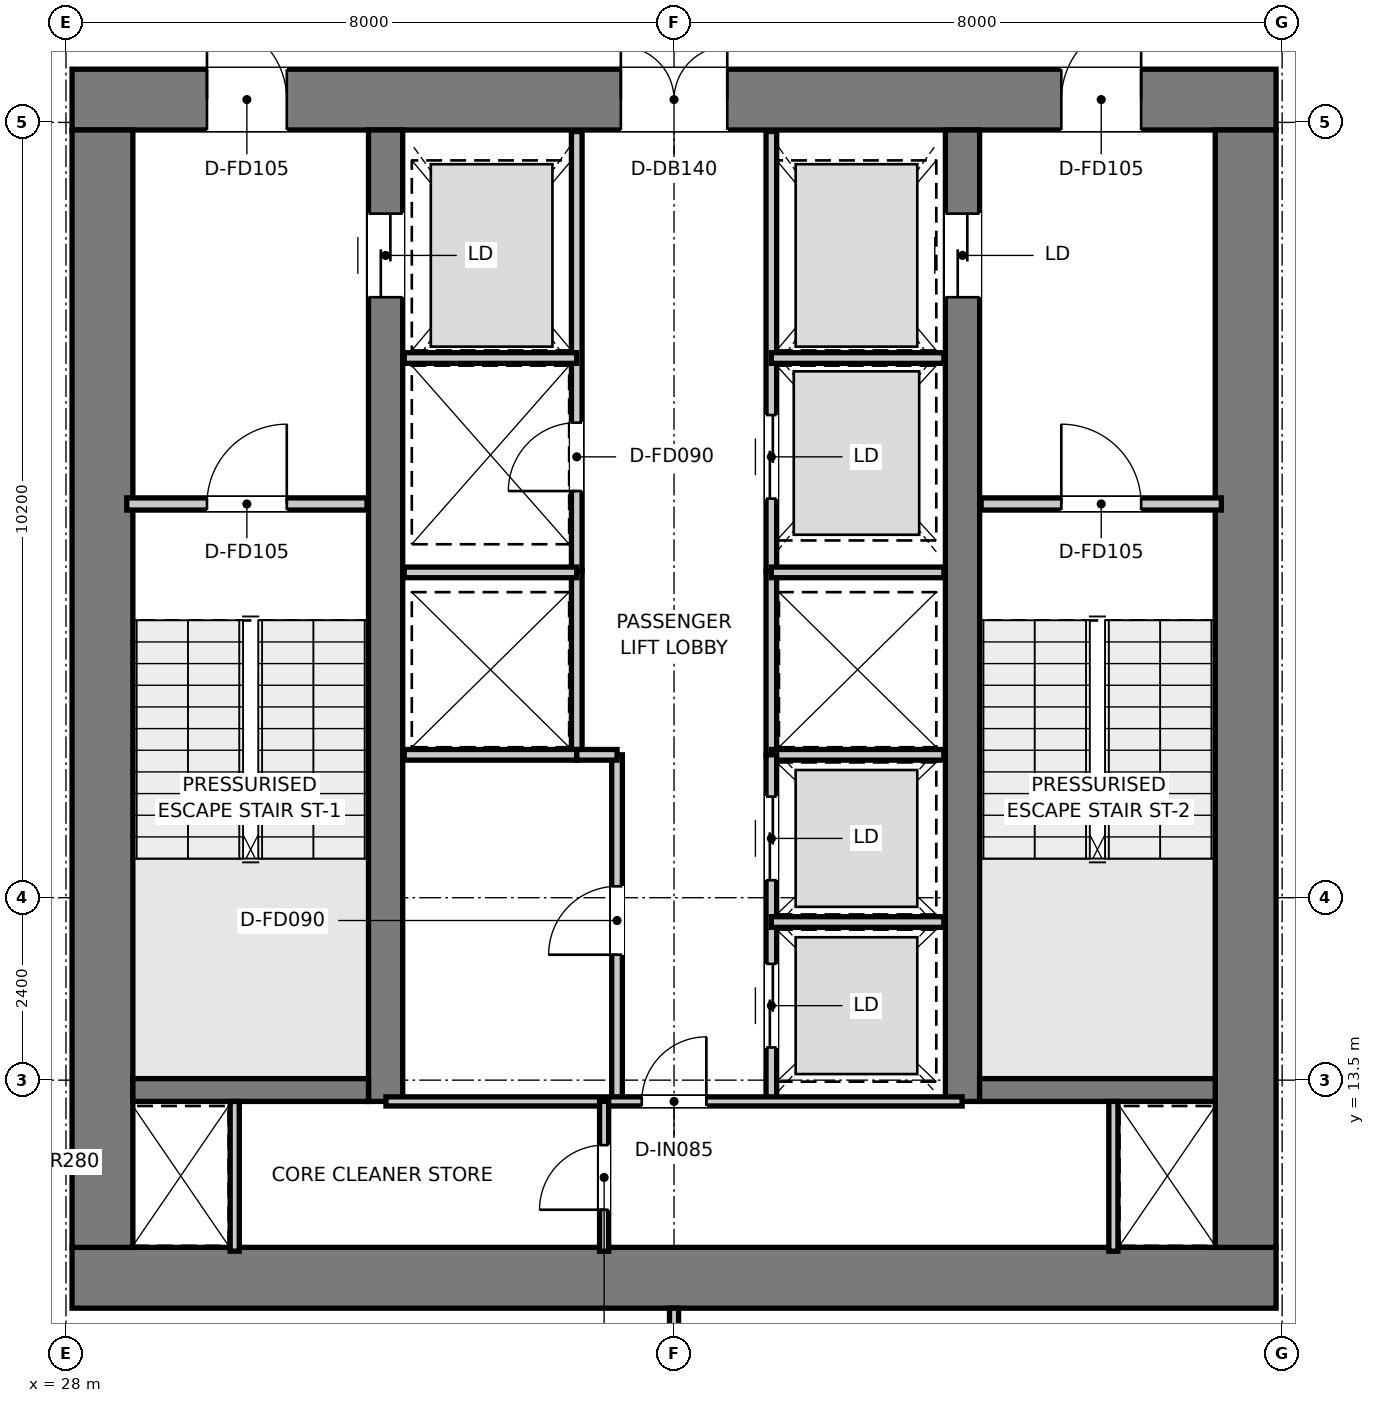
"""IFC4 building model, lengths in metres.
Left out: names, types, materials, properties, quantities, classifications, styles, units other than length and angle.
Written with IfcOpenShell. Run it as: python <this file> out.ifc"""

import sys

from ifc_helpers import new_model, si_unit, direction, frame, frame_2d, origin, place, context, subcontext, project, spatial, rectangle, extrude, element, fill, save


model = new_model("IFC4")
c1 = context("Model", 3, precision=1e-05, world=origin(), true_north=direction((0.0, 1.0)))
c2 = subcontext(c1, "Body", "Model", "MODEL_VIEW")
j1 = project(units=[si_unit("LENGTHUNIT", "METRE"), si_unit("PLANEANGLEUNIT", "RADIAN")], contexts=[c1])
p1 = place(None, origin())
s1 = spatial("IfcSite", under=j1, at=p1, CompositionType="ELEMENT")
p2 = place(p1, origin())
s2 = spatial("IfcBuilding", under=s1, at=p2, CompositionType="ELEMENT")
p3 = place(p2, frame((0.0, 0.0, 258.65)))
s3 = spatial("IfcBuildingStorey", under=s2, at=p3, CompositionType="ELEMENT", Elevation=258.65)
p4 = place(p3, frame((28.08, 10.9, 0.0), z_axis=(0.0, 0.0, 1.0), x_axis=(1.0, 0.0, 0.0)))
e1 = element("IfcWall", 1, at=p4, inside=s3, PredefinedType="SHEAR", context=c2, shape_type="SweptSolid", body=[
    extrude(rectangle(XDim=15.84, YDim=0.8, at=frame_2d((7.92, 0.0))), origin(), (0.0, 0.0, 1.0), 3.95),
])
p5 = place(p3, frame((28.08, 26.4, 0.0), z_axis=(0.0, 0.0, 1.0), x_axis=(1.0, 0.0, 0.0)))
e2 = element("IfcWall", 2, at=p5, inside=s3, PredefinedType="SHEAR", context=c2, shape_type="SweptSolid", body=[
    extrude(rectangle(XDim=15.84, YDim=0.8, at=frame_2d((7.92, 0.0))), origin(), (0.0, 0.0, 1.0), 3.95),
])
p6 = place(p5, frame((7.22, 0.0, 0.0)))
e3 = element("IfcOpeningElement", 3, at=p6, cuts=e2, PredefinedType="OPENING", context=c2, shape_type="SweptSolid", body=[
    extrude(rectangle(XDim=1.4, YDim=2.2, at=frame_2d((0.7, 1.1))), frame((0.0, 0.41, 0.0), z_axis=(0.0, -1.0, 0.0), x_axis=(1.0, 0.0, 0.0)), (0.0, 0.0, 1.0), 0.82),
])
p7 = place(p5, frame((1.775, 0.0, 0.0)))
e4 = element("IfcOpeningElement", 4, at=p7, cuts=e2, PredefinedType="OPENING", context=c2, shape_type="SweptSolid", body=[
    extrude(rectangle(XDim=1.05, YDim=2.1, at=frame_2d((0.525, 1.05))), frame((0.0, 0.41, 0.0), z_axis=(0.0, -1.0, 0.0), x_axis=(1.0, 0.0, 0.0)), (0.0, 0.0, 1.0), 0.82),
])
p8 = place(p5, frame((13.015, 0.0, 0.0)))
e5 = element("IfcOpeningElement", 5, at=p8, cuts=e2, PredefinedType="OPENING", context=c2, shape_type="SweptSolid", body=[
    extrude(rectangle(XDim=1.05, YDim=2.1, at=frame_2d((0.525, 1.05))), frame((0.0, 0.41, 0.0), z_axis=(0.0, -1.0, 0.0), x_axis=(1.0, 0.0, 0.0)), (0.0, 0.0, 1.0), 0.82),
])
for number, where, z_axis, x_axis in (
    (6, (28.48, 11.3, 0.0), (0.0, 0.0, 1.0), (0.0, 1.0, 0.0)),
    (7, (43.52, 11.3, 0.0), (0.0, 0.0, 1.0), (0.0, 1.0, 0.0)),
):
    element("IfcWall", number, at=place(p3, frame(where, z_axis=z_axis, x_axis=x_axis)), inside=s3, PredefinedType="SHEAR", context=c2, shape_type="SweptSolid", body=[
        extrude(rectangle(XDim=14.7, YDim=0.8, at=frame_2d((7.35, 0.0))), origin(), (0.0, 0.0, 1.0), 3.95),
    ])
p9 = place(p3, frame((32.205, 13.22, 0.0), z_axis=(0.0, 0.0, 1.0), x_axis=(0.0, 1.0, 0.0)))
e8 = element("IfcWall", 8, at=p9, inside=s3, PredefinedType="SHEAR", context=c2, shape_type="SweptSolid", body=[
    extrude(rectangle(XDim=12.78, YDim=0.45, at=frame_2d((6.39, 0.0))), origin(), (0.0, 0.0, 1.0), 3.95),
])
p10 = place(p9, frame((10.58, 0.0, 0.0)))
e9 = element("IfcOpeningElement", 9, at=p10, cuts=e8, PredefinedType="OPENING", context=c2, shape_type="SweptSolid", body=[
    extrude(rectangle(XDim=1.1, YDim=2.15, at=frame_2d((0.55, 1.075))), frame((0.0, 0.235, 0.0), z_axis=(0.0, -1.0, 0.0), x_axis=(1.0, 0.0, 0.0)), (0.0, 0.0, 1.0), 0.47),
])
p11 = place(p3, frame((39.795, 13.22, 0.0), z_axis=(0.0, 0.0, 1.0), x_axis=(0.0, 1.0, 0.0)))
e10 = element("IfcWall", 10, at=p11, inside=s3, PredefinedType="SHEAR", context=c2, shape_type="SweptSolid", body=[
    extrude(rectangle(XDim=12.78, YDim=0.45, at=frame_2d((6.39, 0.0))), origin(), (0.0, 0.0, 1.0), 3.95),
])
p12 = place(p11, frame((10.58, 0.0, 0.0)))
e11 = element("IfcOpeningElement", 11, at=p12, cuts=e10, PredefinedType="OPENING", context=c2, shape_type="SweptSolid", body=[
    extrude(rectangle(XDim=1.1, YDim=2.15, at=frame_2d((0.55, 1.075))), frame((0.0, 0.235, 0.0), z_axis=(0.0, -1.0, 0.0), x_axis=(1.0, 0.0, 0.0)), (0.0, 0.0, 1.0), 0.47),
])
for number, where, z_axis, x_axis in (
    (12, (28.88, 13.37, 0.0), (0.0, 0.0, 1.0), (1.0, 0.0, 0.0)),
    (13, (40.02, 13.37, 0.0), (0.0, 0.0, 1.0), (1.0, 0.0, 0.0)),
):
    element("IfcWall", number, at=place(p3, frame(where, z_axis=z_axis, x_axis=x_axis)), inside=s3, PredefinedType="SHEAR", context=c2, shape_type="SweptSolid", body=[
        extrude(rectangle(XDim=3.1, YDim=0.3, at=frame_2d((1.55, 0.0))), origin(), (0.0, 0.0, 1.0), 3.95),
    ])
p13 = place(p3, frame((28.8, 21.08, 0.0), z_axis=(0.0, 0.0, 1.0), x_axis=(1.0, 0.0, 0.0)))
e14 = element("IfcWall", 14, at=p13, inside=s3, PredefinedType="PARTITIONING", context=c2, shape_type="SweptSolid", body=[
    extrude(rectangle(XDim=3.16, YDim=0.16, at=frame_2d((1.58, 0.0))), origin(), (0.0, 0.0, 1.0), 3.6),
])
p14 = place(p13, frame((1.055, 0.0, 0.0)))
e15 = element("IfcOpeningElement", 15, at=p14, cuts=e14, PredefinedType="OPENING", context=c2, shape_type="SweptSolid", body=[
    extrude(rectangle(XDim=1.05, YDim=2.1, at=frame_2d((0.525, 1.05))), frame((0.0, 0.09, 0.0), z_axis=(0.0, -1.0, 0.0), x_axis=(1.0, 0.0, 0.0)), (0.0, 0.0, 1.0), 0.18),
])
p15 = place(p3, frame((40.04, 21.08, 0.0), z_axis=(0.0, 0.0, 1.0), x_axis=(1.0, 0.0, 0.0)))
e16 = element("IfcWall", 16, at=p15, inside=s3, PredefinedType="PARTITIONING", context=c2, shape_type="SweptSolid", body=[
    extrude(rectangle(XDim=3.16, YDim=0.16, at=frame_2d((1.58, 0.0))), origin(), (0.0, 0.0, 1.0), 3.6),
])
p16 = place(p15, frame((1.055, 0.0, 0.0)))
e17 = element("IfcOpeningElement", 17, at=p16, cuts=e16, PredefinedType="OPENING", context=c2, shape_type="SweptSolid", body=[
    extrude(rectangle(XDim=1.05, YDim=2.1, at=frame_2d((0.525, 1.05))), frame((0.0, 0.09, 0.0), z_axis=(0.0, -1.0, 0.0), x_axis=(1.0, 0.0, 0.0)), (0.0, 0.0, 1.0), 0.18),
])
p17 = place(p3, frame((34.72, 20.2, 0.0), z_axis=(0.0, 0.0, 1.0), x_axis=(0.0, 1.0, 0.0)))
e18 = element("IfcWall", 18, at=p17, inside=s3, PredefinedType="PARTITIONING", context=c2, shape_type="SweptSolid", body=[
    extrude(rectangle(XDim=5.78, YDim=0.14, at=frame_2d((2.89, 0.0))), origin(), (0.0, 0.0, 1.0), 2.75),
])
p18 = place(p17, frame((1.05, 0.0, 0.0)))
e19 = element("IfcOpeningElement", 19, at=p18, cuts=e18, PredefinedType="OPENING", context=c2, shape_type="SweptSolid", body=[
    extrude(rectangle(XDim=0.9, YDim=2.1, at=frame_2d((0.45, 1.05))), frame((0.0, 0.08, 0.0), z_axis=(0.0, -1.0, 0.0), x_axis=(1.0, 0.0, 0.0)), (0.0, 0.0, 1.0), 0.16),
])
p19 = place(p3, frame((37.28, 20.2, 0.0), z_axis=(0.0, 0.0, 1.0), x_axis=(0.0, 1.0, 0.0)))
e20 = element("IfcWall", 20, at=p19, inside=s3, PredefinedType="PARTITIONING", context=c2, shape_type="SweptSolid", body=[
    extrude(rectangle(XDim=5.78, YDim=0.14, at=frame_2d((2.89, 0.0))), origin(), (0.0, 0.0, 1.0), 2.75),
])
p20 = place(p19, frame((0.95, 0.0, 0.0)))
e21 = element("IfcOpeningElement", 21, at=p20, cuts=e20, PredefinedType="OPENING", context=c2, shape_type="SweptSolid", body=[
    extrude(rectangle(XDim=1.1, YDim=2.15, at=frame_2d((0.55, 1.075))), frame((0.0, 0.08, 0.0), z_axis=(0.0, -1.0, 0.0), x_axis=(1.0, 0.0, 0.0)), (0.0, 0.0, 1.0), 0.16),
])
for number, where, z_axis, x_axis in (
    (22, (32.45, 23.0, 0.0), (0.0, 0.0, 1.0), (1.0, 0.0, 0.0)),
    (23, (37.28, 23.0, 0.0), (0.0, 0.0, 1.0), (1.0, 0.0, 0.0)),
):
    element("IfcWall", number, at=place(p3, frame(where, z_axis=z_axis, x_axis=x_axis)), inside=s3, PredefinedType="PARTITIONING", context=c2, shape_type="SweptSolid", body=[
        extrude(rectangle(XDim=2.27, YDim=0.14, at=frame_2d((1.135, 0.0))), origin(), (0.0, 0.0, 1.0), 2.75),
    ])
for number, where, z_axis, x_axis in (
    (24, (34.72, 17.78, 0.0), (0.0, 0.0, 1.0), (0.0, 1.0, 0.0)),
    (25, (37.28, 17.78, 0.0), (0.0, 0.0, 1.0), (0.0, 1.0, 0.0)),
):
    element("IfcWall", number, at=place(p3, frame(where, z_axis=z_axis, x_axis=x_axis)), inside=s3, PredefinedType="PARTITIONING", context=c2, shape_type="SweptSolid", body=[
        extrude(rectangle(XDim=2.42, YDim=0.14, at=frame_2d((1.21, 0.0))), origin(), (0.0, 0.0, 1.0), 3.6),
    ])
for number, where, z_axis, x_axis in (
    (26, (32.45, 17.78, 0.0), (0.0, 0.0, 1.0), (1.0, 0.0, 0.0)),
    (27, (32.45, 20.18, 0.0), (0.0, 0.0, 1.0), (1.0, 0.0, 0.0)),
    (28, (37.28, 17.78, 0.0), (0.0, 0.0, 1.0), (1.0, 0.0, 0.0)),
    (29, (37.28, 20.18, 0.0), (0.0, 0.0, 1.0), (1.0, 0.0, 0.0)),
):
    element("IfcWall", number, at=place(p3, frame(where, z_axis=z_axis, x_axis=x_axis)), inside=s3, PredefinedType="PARTITIONING", context=c2, shape_type="SweptSolid", body=[
        extrude(rectangle(XDim=2.27, YDim=0.14, at=frame_2d((1.135, 0.0))), origin(), (0.0, 0.0, 1.0), 3.6),
    ])
p21 = place(p3, frame((35.25, 13.22, 0.0), z_axis=(0.0, 0.0, 1.0), x_axis=(0.0, 1.0, 0.0)))
e30 = element("IfcWall", 30, at=p21, inside=s3, PredefinedType="PARTITIONING", context=c2, shape_type="SweptSolid", body=[
    extrude(rectangle(XDim=4.56, YDim=0.14, at=frame_2d((2.28, 0.0))), origin(), (0.0, 0.0, 1.0), 3.6),
])
p22 = place(p21, frame((1.93, 0.0, 0.0)))
e31 = element("IfcOpeningElement", 31, at=p22, cuts=e30, PredefinedType="OPENING", context=c2, shape_type="SweptSolid", body=[
    extrude(rectangle(XDim=0.9, YDim=2.1, at=frame_2d((0.45, 1.05))), frame((0.0, 0.08, 0.0), z_axis=(0.0, -1.0, 0.0), x_axis=(1.0, 0.0, 0.0)), (0.0, 0.0, 1.0), 0.16),
])
p23 = place(p3, frame((34.72, 17.78, 0.0), z_axis=(0.0, 0.0, 1.0), x_axis=(1.0, 0.0, 0.0)))
e32 = element("IfcWall", 32, at=p23, inside=s3, PredefinedType="PARTITIONING", context=c2, shape_type="SweptSolid", body=[
    extrude(rectangle(XDim=0.53, YDim=0.14, at=frame_2d((0.265, 0.0))), origin(), (0.0, 0.0, 1.0), 3.6),
])
p24 = place(p3, frame((37.28, 13.22, 0.0), z_axis=(0.0, 0.0, 1.0), x_axis=(0.0, 1.0, 0.0)))
e33 = element("IfcWall", 33, at=p24, inside=s3, PredefinedType="PARTITIONING", context=c2, shape_type="SweptSolid", body=[
    extrude(rectangle(XDim=4.56, YDim=0.14, at=frame_2d((2.28, 0.0))), origin(), (0.0, 0.0, 1.0), 3.6),
])
p25 = place(p24, frame((0.71, 0.0, 0.0)))
e34 = element("IfcOpeningElement", 34, at=p25, cuts=e33, PredefinedType="OPENING", context=c2, shape_type="SweptSolid", body=[
    extrude(rectangle(XDim=1.1, YDim=2.15, at=frame_2d((0.55, 1.075))), frame((0.0, 0.08, 0.0), z_axis=(0.0, -1.0, 0.0), x_axis=(1.0, 0.0, 0.0)), (0.0, 0.0, 1.0), 0.16),
])
p26 = place(p24, frame((2.91, 0.0, 0.0)))
e35 = element("IfcOpeningElement", 35, at=p26, cuts=e33, PredefinedType="OPENING", context=c2, shape_type="SweptSolid", body=[
    extrude(rectangle(XDim=1.1, YDim=2.15, at=frame_2d((0.55, 1.075))), frame((0.0, 0.08, 0.0), z_axis=(0.0, -1.0, 0.0), x_axis=(1.0, 0.0, 0.0)), (0.0, 0.0, 1.0), 0.16),
])
p27 = place(p3, frame((37.28, 15.58, 0.0), z_axis=(0.0, 0.0, 1.0), x_axis=(1.0, 0.0, 0.0)))
e36 = element("IfcWall", 36, at=p27, inside=s3, PredefinedType="PARTITIONING", context=c2, shape_type="SweptSolid", body=[
    extrude(rectangle(XDim=2.27, YDim=0.14, at=frame_2d((1.135, 0.0))), origin(), (0.0, 0.0, 1.0), 3.6),
])
for number, where, z_axis, x_axis in (
    (37, (30.22, 11.25, 0.0), (0.0, 0.0, 1.0), (0.0, 1.0, 0.0)),
    (38, (41.78, 11.25, 0.0), (0.0, 0.0, 1.0), (0.0, 1.0, 0.0)),
):
    element("IfcWall", number, at=place(p3, frame(where, z_axis=z_axis, x_axis=x_axis)), inside=s3, PredefinedType="PARTITIONING", context=c2, shape_type="SweptSolid", body=[
        extrude(rectangle(XDim=1.97, YDim=0.12, at=frame_2d((0.985, 0.0))), origin(), (0.0, 0.0, 1.0), 3.6),
    ])
p28 = place(p3, frame((32.21, 13.22, 0.0), z_axis=(0.0, 0.0, 1.0), x_axis=(1.0, 0.0, 0.0)))
e39 = element("IfcWall", 39, at=p28, inside=s3, PredefinedType="PARTITIONING", context=c2, shape_type="SweptSolid", body=[
    extrude(rectangle(XDim=7.58, YDim=0.12, at=frame_2d((3.79, 0.0))), origin(), (0.0, 0.0, 1.0), 3.6),
])
p29 = place(p28, frame((3.365, 0.0, 0.0)))
e40 = element("IfcOpeningElement", 40, at=p29, cuts=e39, PredefinedType="OPENING", context=c2, shape_type="SweptSolid", body=[
    extrude(rectangle(XDim=0.85, YDim=2.1, at=frame_2d((0.425, 1.05))), frame((0.0, 0.07, 0.0), z_axis=(0.0, -1.0, 0.0), x_axis=(1.0, 0.0, 0.0)), (0.0, 0.0, 1.0), 0.14),
])
p30 = place(p3, frame((35.08, 11.25, 0.0), z_axis=(0.0, 0.0, 1.0), x_axis=(0.0, 1.0, 0.0)))
e41 = element("IfcWall", 41, at=p30, inside=s3, PredefinedType="PARTITIONING", context=c2, shape_type="SweptSolid", body=[
    extrude(rectangle(XDim=1.97, YDim=0.12, at=frame_2d((0.985, 0.0))), origin(), (0.0, 0.0, 1.0), 3.6),
])
p31 = place(p30, frame((0.545, 0.0, 0.0)))
e42 = element("IfcOpeningElement", 42, at=p31, cuts=e41, PredefinedType="OPENING", context=c2, shape_type="SweptSolid", body=[
    extrude(rectangle(XDim=0.85, YDim=2.1, at=frame_2d((0.425, 1.05))), frame((0.0, 0.07, 0.0), z_axis=(0.0, -1.0, 0.0), x_axis=(1.0, 0.0, 0.0)), (0.0, 0.0, 1.0), 0.14),
])
p32 = place(p3, frame((36.0, 3.475, 0.0), z_axis=(0.0, 0.0, 1.0), x_axis=(0.0, 1.0, 0.0)))
e43 = element("IfcWall", 43, at=p32, inside=s3, PredefinedType="PARTITIONING", context=c2, shape_type="SweptSolid", body=[
    extrude(rectangle(XDim=7.025, YDim=0.12, at=frame_2d((3.512, 0.0))), origin(), (0.0, 0.0, 1.0), 3.6),
])
p33 = place(p14, origin())
e44 = element("IfcDoor", 44, at=p33, inside=s3, OperationType="SINGLE_SWING_RIGHT", PredefinedType="DOOR", context=c2, shape_type="SweptSolid", body=[
    extrude(rectangle(XDim=1.05, YDim=2.1, at=frame_2d((0.525, 1.05))), frame((0.0, 0.025, 0.0), z_axis=(0.0, -1.0, 0.0), x_axis=(1.0, 0.0, 0.0)), (0.0, 0.0, 1.0), 0.05),
])
fill(e15, e44)
p34 = place(p16, origin())
e45 = element("IfcDoor", 45, at=p34, inside=s3, OperationType="SINGLE_SWING_LEFT", PredefinedType="DOOR", context=c2, shape_type="SweptSolid", body=[
    extrude(rectangle(XDim=1.05, YDim=2.1, at=frame_2d((0.525, 1.05))), frame((0.0, 0.025, 0.0), z_axis=(0.0, -1.0, 0.0), x_axis=(1.0, 0.0, 0.0)), (0.0, 0.0, 1.0), 0.05),
])
fill(e17, e45)
p35 = place(p6, origin())
e46 = element("IfcDoor", 46, at=p35, inside=s3, OperationType="DOUBLE_DOOR_SINGLE_SWING", PredefinedType="DOOR", context=c2, shape_type="SweptSolid", body=[
    extrude(rectangle(XDim=1.4, YDim=2.2, at=frame_2d((0.7, 1.1))), frame((0.0, 0.025, 0.0), z_axis=(0.0, -1.0, 0.0), x_axis=(1.0, 0.0, 0.0)), (0.0, 0.0, 1.0), 0.05),
])
fill(e3, e46)
p36 = place(p7, origin())
e47 = element("IfcDoor", 47, at=p36, inside=s3, OperationType="SINGLE_SWING_LEFT", PredefinedType="DOOR", context=c2, shape_type="SweptSolid", body=[
    extrude(rectangle(XDim=1.05, YDim=2.1, at=frame_2d((0.525, 1.05))), frame((0.0, 0.025, 0.0), z_axis=(0.0, -1.0, 0.0), x_axis=(1.0, 0.0, 0.0)), (0.0, 0.0, 1.0), 0.05),
])
fill(e4, e47)
p37 = place(p8, origin())
e48 = element("IfcDoor", 48, at=p37, inside=s3, OperationType="SINGLE_SWING_RIGHT", PredefinedType="DOOR", context=c2, shape_type="SweptSolid", body=[
    extrude(rectangle(XDim=1.05, YDim=2.1, at=frame_2d((0.525, 1.05))), frame((0.0, 0.025, 0.0), z_axis=(0.0, -1.0, 0.0), x_axis=(1.0, 0.0, 0.0)), (0.0, 0.0, 1.0), 0.05),
])
fill(e5, e48)
p38 = place(p10, origin())
e49 = element("IfcDoor", 49, at=p38, inside=s3, OperationType="DOUBLE_DOOR_SLIDING", PredefinedType="DOOR", context=c2, shape_type="SweptSolid", body=[
    extrude(rectangle(XDim=1.1, YDim=2.15, at=frame_2d((0.55, 1.075))), frame((0.0, 0.025, 0.0), z_axis=(0.0, -1.0, 0.0), x_axis=(1.0, 0.0, 0.0)), (0.0, 0.0, 1.0), 0.05),
])
fill(e9, e49)
p39 = place(p12, origin())
e50 = element("IfcDoor", 50, at=p39, inside=s3, OperationType="DOUBLE_DOOR_SLIDING", PredefinedType="DOOR", context=c2, shape_type="SweptSolid", body=[
    extrude(rectangle(XDim=1.1, YDim=2.15, at=frame_2d((0.55, 1.075))), frame((0.0, 0.025, 0.0), z_axis=(0.0, -1.0, 0.0), x_axis=(1.0, 0.0, 0.0)), (0.0, 0.0, 1.0), 0.05),
])
fill(e11, e50)
p40 = place(p18, origin())
e51 = element("IfcDoor", 51, at=p40, inside=s3, OperationType="SINGLE_SWING_LEFT", PredefinedType="DOOR", context=c2, shape_type="SweptSolid", body=[
    extrude(rectangle(XDim=0.9, YDim=2.1, at=frame_2d((0.45, 1.05))), frame((0.0, 0.025, 0.0), z_axis=(0.0, -1.0, 0.0), x_axis=(1.0, 0.0, 0.0)), (0.0, 0.0, 1.0), 0.05),
])
fill(e19, e51)
p41 = place(p20, origin())
e52 = element("IfcDoor", 52, at=p41, inside=s3, OperationType="DOUBLE_DOOR_SLIDING", PredefinedType="DOOR", context=c2, shape_type="SweptSolid", body=[
    extrude(rectangle(XDim=1.1, YDim=2.15, at=frame_2d((0.55, 1.075))), frame((0.0, 0.025, 0.0), z_axis=(0.0, -1.0, 0.0), x_axis=(1.0, 0.0, 0.0)), (0.0, 0.0, 1.0), 0.05),
])
fill(e21, e52)
p42 = place(p22, origin())
e53 = element("IfcDoor", 53, at=p42, inside=s3, OperationType="SINGLE_SWING_LEFT", PredefinedType="DOOR", context=c2, shape_type="SweptSolid", body=[
    extrude(rectangle(XDim=0.9, YDim=2.1, at=frame_2d((0.45, 1.05))), frame((0.0, 0.025, 0.0), z_axis=(0.0, -1.0, 0.0), x_axis=(1.0, 0.0, 0.0)), (0.0, 0.0, 1.0), 0.05),
])
fill(e31, e53)
p43 = place(p25, origin())
e54 = element("IfcDoor", 54, at=p43, inside=s3, OperationType="DOUBLE_DOOR_SLIDING", PredefinedType="DOOR", context=c2, shape_type="SweptSolid", body=[
    extrude(rectangle(XDim=1.1, YDim=2.15, at=frame_2d((0.55, 1.075))), frame((0.0, 0.025, 0.0), z_axis=(0.0, -1.0, 0.0), x_axis=(1.0, 0.0, 0.0)), (0.0, 0.0, 1.0), 0.05),
])
fill(e34, e54)
p44 = place(p26, origin())
e55 = element("IfcDoor", 55, at=p44, inside=s3, OperationType="DOUBLE_DOOR_SLIDING", PredefinedType="DOOR", context=c2, shape_type="SweptSolid", body=[
    extrude(rectangle(XDim=1.1, YDim=2.15, at=frame_2d((0.55, 1.075))), frame((0.0, 0.025, 0.0), z_axis=(0.0, -1.0, 0.0), x_axis=(1.0, 0.0, 0.0)), (0.0, 0.0, 1.0), 0.05),
])
fill(e35, e55)
p45 = place(p29, origin())
e56 = element("IfcDoor", 56, at=p45, inside=s3, OperationType="SINGLE_SWING_RIGHT", PredefinedType="DOOR", context=c2, shape_type="SweptSolid", body=[
    extrude(rectangle(XDim=0.85, YDim=2.1, at=frame_2d((0.425, 1.05))), frame((0.0, 0.025, 0.0), z_axis=(0.0, -1.0, 0.0), x_axis=(1.0, 0.0, 0.0)), (0.0, 0.0, 1.0), 0.05),
])
fill(e40, e56)
p46 = place(p31, origin())
e57 = element("IfcDoor", 57, at=p46, inside=s3, OperationType="SINGLE_SWING_LEFT", PredefinedType="DOOR", context=c2, shape_type="SweptSolid", body=[
    extrude(rectangle(XDim=0.85, YDim=2.1, at=frame_2d((0.425, 1.05))), frame((0.0, 0.025, 0.0), z_axis=(0.0, -1.0, 0.0), x_axis=(1.0, 0.0, 0.0)), (0.0, 0.0, 1.0), 0.05),
])
fill(e42, e57)
save(model, sys.argv[1])
